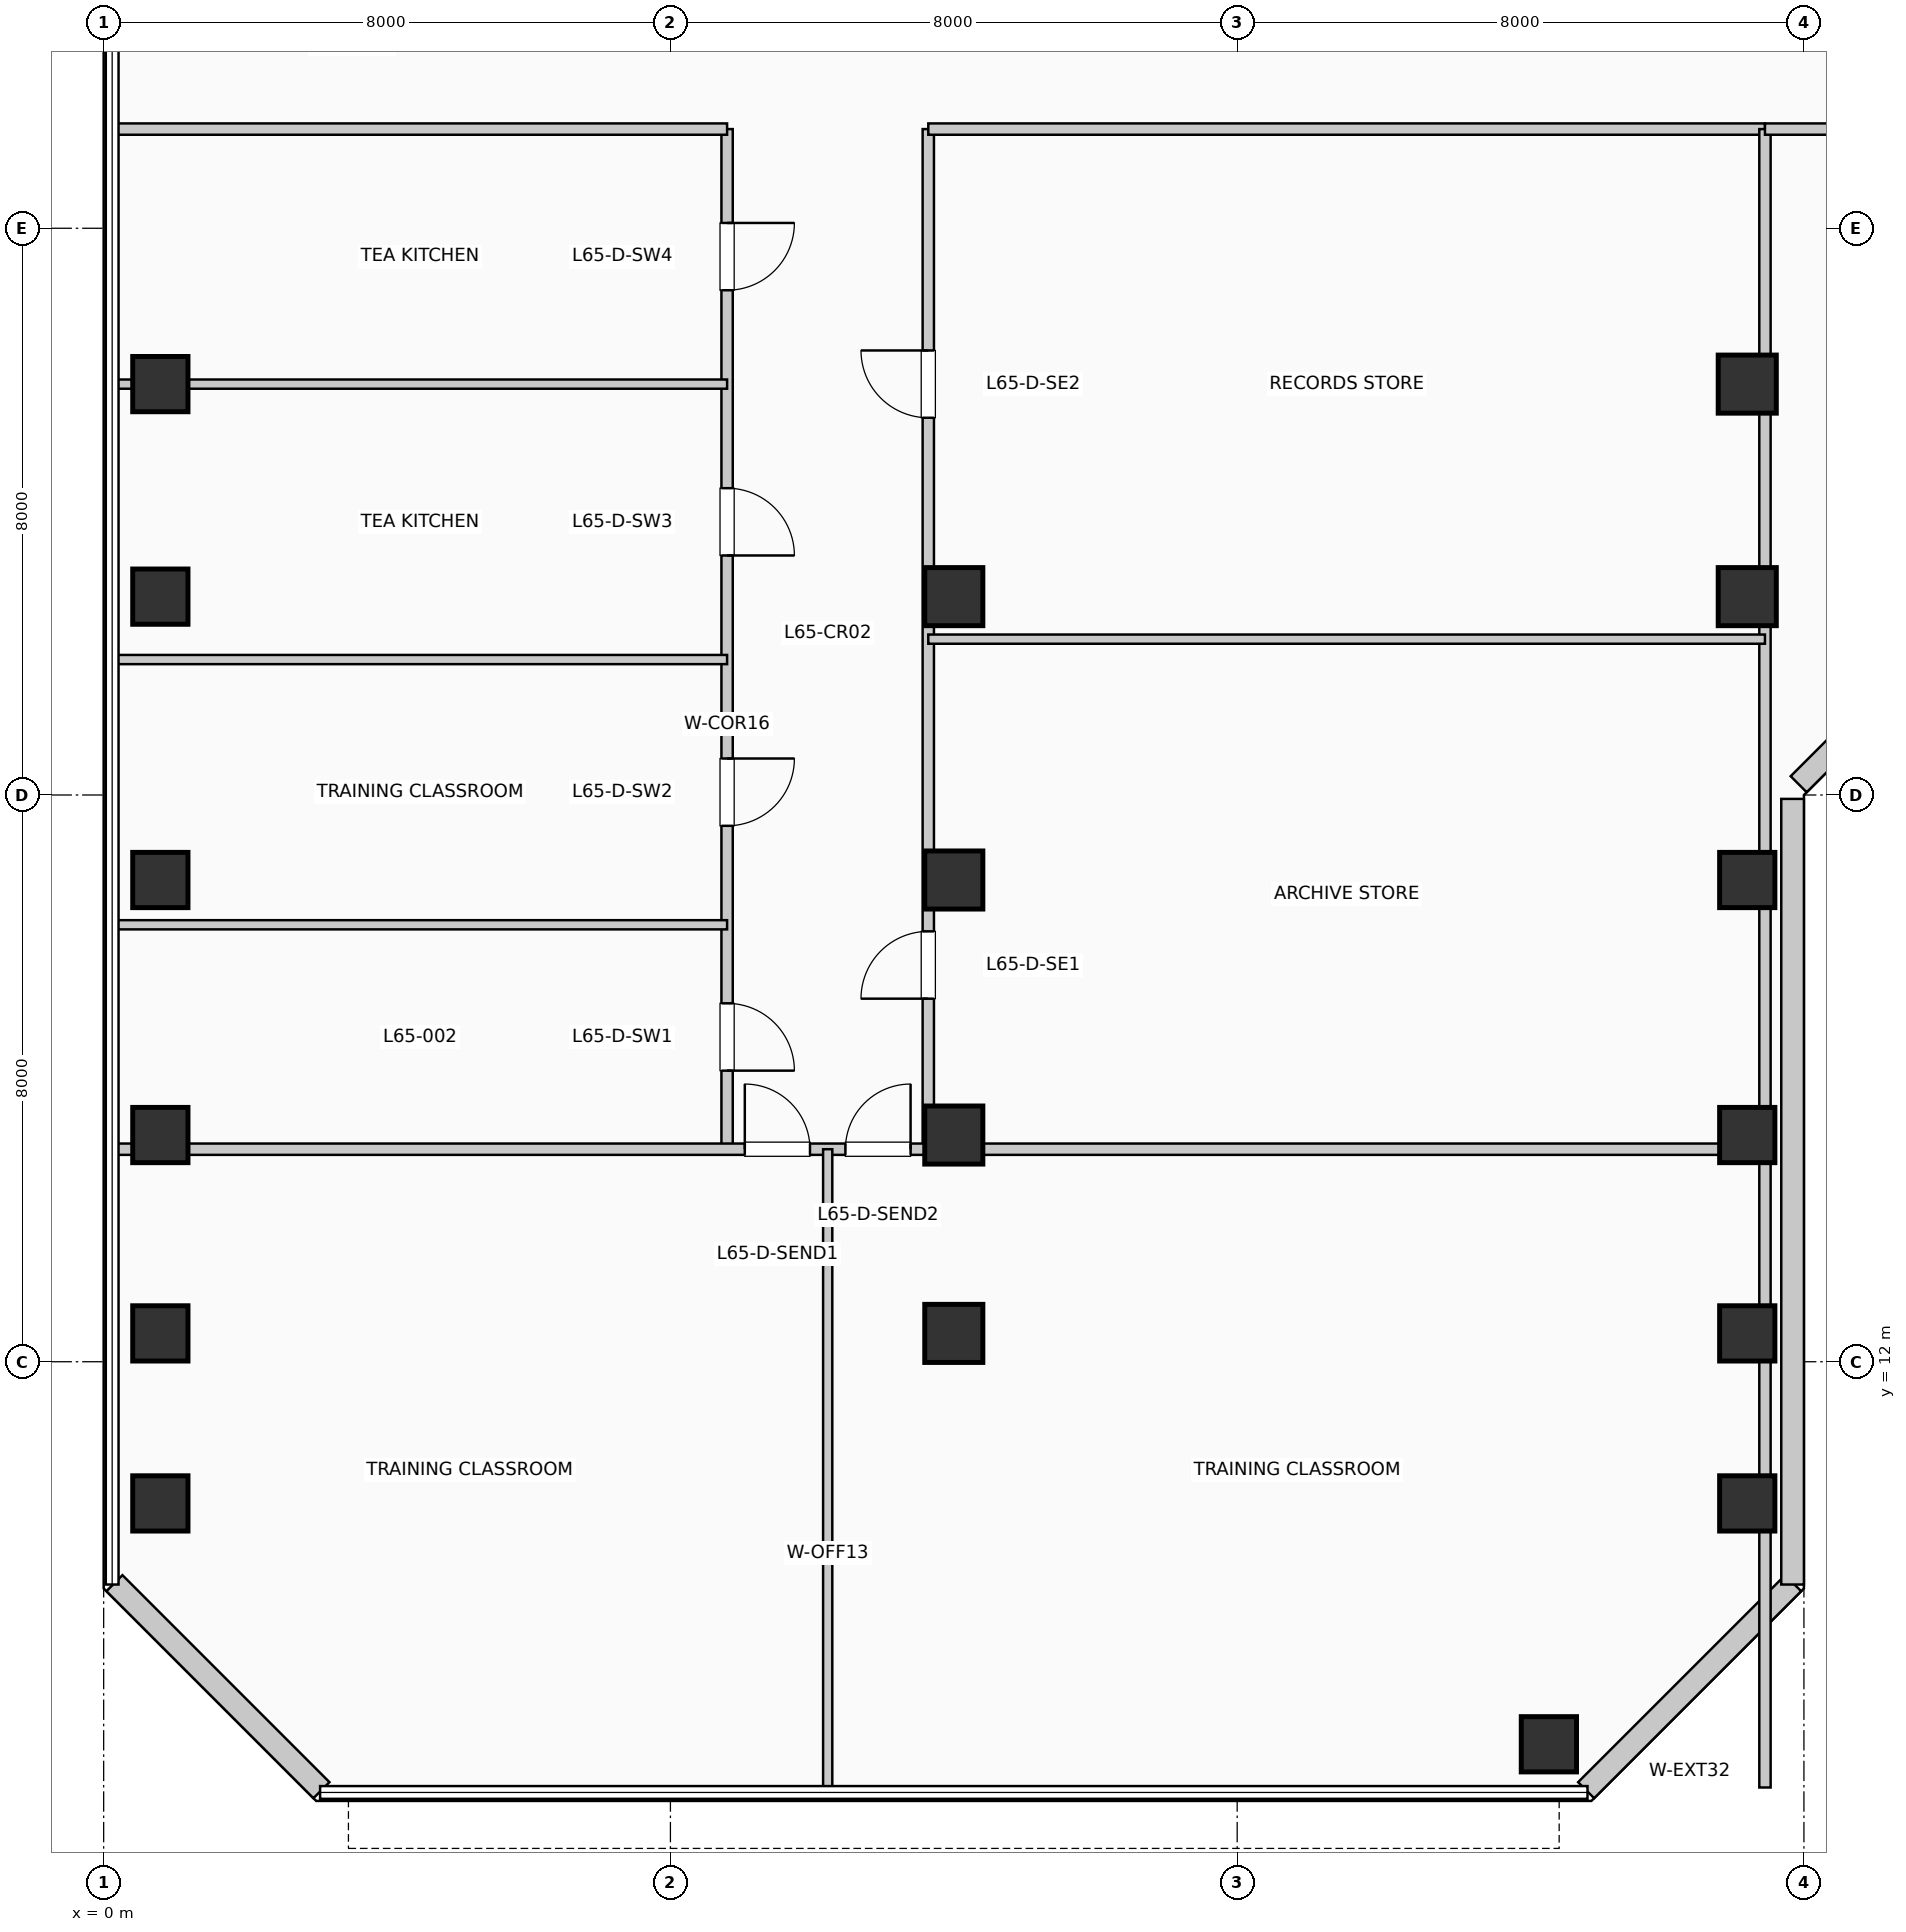
"""IFC4 building model, lengths in metres.
Left out: names, types, materials, properties, quantities, classifications, styles, units other than length and angle.
Written with IfcOpenShell. Run it as: python <this file> out.ifc"""

import sys

from ifc_helpers import new_model, si_unit, direction, frame, frame_2d, origin, origin_2d, place, context, subcontext, project, spatial, rectangle, extrude, element, fill, save


model = new_model("IFC4")
c1 = context("Model", 3, precision=1e-05, world=origin(), true_north=direction((0.0, 1.0)))
c2 = subcontext(c1, "Body", "Model", "MODEL_VIEW")
j1 = project(units=[si_unit("LENGTHUNIT", "METRE"), si_unit("PLANEANGLEUNIT", "RADIAN")], contexts=[c1])
p1 = place(None, origin())
s1 = spatial("IfcSite", under=j1, at=p1, CompositionType="ELEMENT")
p2 = place(p1, origin())
s2 = spatial("IfcBuilding", under=s1, at=p2, CompositionType="ELEMENT")
p3 = place(p2, frame((0.0, 0.0, 268.29)))
s3 = spatial("IfcBuildingStorey", under=s2, at=p3, CompositionType="ELEMENT", Elevation=268.29)
for number, where, z_axis, x_axis in (
    (1, (0.8, 10.0, 0.0), (0.0, 0.0, 1.0), (1.0, 0.0, 0.0)),
    (2, (0.8, 12.4, 0.0), (0.0, 0.0, 1.0), (1.0, 0.0, 0.0)),
    (3, (0.8, 15.2, 0.0), (0.0, 0.0, 1.0), (1.0, 0.0, 0.0)),
    (4, (0.8, 18.8, 0.0), (0.0, 0.0, 1.0), (1.0, 0.0, 0.0)),
    (5, (0.8, 22.8, 0.0), (0.0, 0.0, 1.0), (1.0, 0.0, 0.0)),
    (6, (0.8, 25.8, 0.0), (0.0, 0.0, 1.0), (1.0, 0.0, 0.0)),
):
    element("IfcColumn", number, at=place(p3, frame(where, z_axis=z_axis, x_axis=x_axis)), inside=s3, PredefinedType="COLUMN", context=c2, shape_type="SweptSolid", body=[
        extrude(rectangle(XDim=0.78, YDim=0.78, at=origin_2d()), origin(), (0.0, 0.0, 1.0), 3.96),
    ])
for number, where, z_axis, x_axis in (
    (7, (12.0, 12.4, 0.0), (0.0, 0.0, 1.0), (1.0, 0.0, 0.0)),
    (8, (12.0, 15.2, 0.0), (0.0, 0.0, 1.0), (1.0, 0.0, 0.0)),
    (9, (12.0, 18.8, 0.0), (0.0, 0.0, 1.0), (1.0, 0.0, 0.0)),
    (10, (12.0, 22.8, 0.0), (0.0, 0.0, 1.0), (1.0, 0.0, 0.0)),
):
    element("IfcColumn", number, at=place(p3, frame(where, z_axis=z_axis, x_axis=x_axis)), inside=s3, PredefinedType="COLUMN", context=c2, shape_type="SweptSolid", body=[
        extrude(rectangle(XDim=0.82, YDim=0.82, at=origin_2d()), origin(), (0.0, 0.0, 1.0), 3.96),
    ])
for number, where, z_axis, x_axis in (
    (11, (20.4, 6.6, 0.0), (0.0, 0.0, 1.0), (1.0, 0.0, 0.0)),
    (12, (23.2, 10.0, 0.0), (0.0, 0.0, 1.0), (1.0, 0.0, 0.0)),
    (13, (23.2, 12.4, 0.0), (0.0, 0.0, 1.0), (1.0, 0.0, 0.0)),
    (14, (23.2, 15.2, 0.0), (0.0, 0.0, 1.0), (1.0, 0.0, 0.0)),
    (15, (23.2, 18.8, 0.0), (0.0, 0.0, 1.0), (1.0, 0.0, 0.0)),
):
    element("IfcColumn", number, at=place(p3, frame(where, z_axis=z_axis, x_axis=x_axis)), inside=s3, PredefinedType="COLUMN", context=c2, shape_type="SweptSolid", body=[
        extrude(rectangle(XDim=0.78, YDim=0.78, at=origin_2d()), origin(), (0.0, 0.0, 1.0), 3.96),
    ])
for number, where, z_axis, x_axis in (
    (16, (23.2, 22.8, 0.0), (0.0, 0.0, 1.0), (1.0, 0.0, 0.0)),
    (17, (23.2, 25.8, 0.0), (0.0, 0.0, 1.0), (1.0, 0.0, 0.0)),
):
    element("IfcColumn", number, at=place(p3, frame(where, z_axis=z_axis, x_axis=x_axis)), inside=s3, PredefinedType="COLUMN", context=c2, shape_type="SweptSolid", body=[
        extrude(rectangle(XDim=0.82, YDim=0.82, at=origin_2d()), origin(), (0.0, 0.0, 1.0), 3.96),
    ])
p4 = place(p3, frame((20.926, 5.952, 0.0), z_axis=(0.0, 0.0, 1.0), x_axis=(0.707077242712, 0.707136318428, 0.0)))
e18 = element("IfcWall", 18, at=p4, inside=s3, PredefinedType="SOLIDWALL", context=c2, shape_type="SweptSolid", body=[
    extrude(rectangle(XDim=4.133, YDim=0.32, at=frame_2d((2.066, 0.0))), origin(), (0.0, 0.0, 1.0), 3.74),
])
p5 = place(p3, frame((23.84, 8.855, 0.0), z_axis=(0.0, 0.0, 1.0), x_axis=(0.0, 1.0, 0.0)))
e19 = element("IfcWall", 19, at=p5, inside=s3, PredefinedType="SOLIDWALL", context=c2, shape_type="SweptSolid", body=[
    extrude(rectangle(XDim=11.09, YDim=0.32, at=frame_2d((5.545, 0.0))), origin(), (0.0, 0.0, 1.0), 3.74),
])
p6 = place(p3, frame((23.926, 20.152, 0.0), z_axis=(0.0, 0.0, 1.0), x_axis=(0.707106781187, 0.707106781187, 0.0)))
e20 = element("IfcWall", 20, at=p6, inside=s3, PredefinedType="SOLIDWALL", context=c2, shape_type="SweptSolid", body=[
    extrude(rectangle(XDim=2.718, YDim=0.32, at=frame_2d((1.359, 0.0))), origin(), (0.0, 0.0, 1.0), 3.74),
])
p7 = place(p3, frame((0.152, 8.874, 0.0), z_axis=(0.0, 0.0, 1.0), x_axis=(0.707077242712, -0.707136318428, 0.0)))
e21 = element("IfcWall", 21, at=p7, inside=s3, PredefinedType="SOLIDWALL", context=c2, shape_type="SweptSolid", body=[
    extrude(rectangle(XDim=4.133, YDim=0.32, at=frame_2d((2.066, 0.0))), origin(), (0.0, 0.0, 1.0), 3.74),
])
p8 = place(p3, frame((8.8, 15.0, 0.0), z_axis=(0.0, 0.0, 1.0), x_axis=(0.0, 1.0, 0.0)))
e22 = element("IfcWall", 22, at=p8, inside=s3, PredefinedType="PARTITIONING", context=c2, shape_type="SweptSolid", body=[
    extrude(rectangle(XDim=14.4, YDim=0.16, at=frame_2d((7.2, 0.0))), origin(), (0.0, 0.0, 1.0), 3.74),
])
p9 = place(p8, frame((2.059, 0.0, 0.0), z_axis=(0.0, 0.0, 1.0), x_axis=(-1.0, 0.0, 0.0)))
e23 = element("IfcOpeningElement", 23, at=p9, cuts=e22, PredefinedType="OPENING", context=c2, shape_type="SweptSolid", body=[
    extrude(rectangle(XDim=0.95, YDim=2.15, at=frame_2d((0.475, 1.075))), frame((0.0, 0.09, 0.0), z_axis=(0.0, -1.0, 0.0), x_axis=(1.0, 0.0, 0.0)), (0.0, 0.0, 1.0), 0.18),
])
p10 = place(p8, frame((5.515, 0.0, 0.0), z_axis=(0.0, 0.0, 1.0), x_axis=(-1.0, 0.0, 0.0)))
e24 = element("IfcOpeningElement", 24, at=p10, cuts=e22, PredefinedType="OPENING", context=c2, shape_type="SweptSolid", body=[
    extrude(rectangle(XDim=0.95, YDim=2.15, at=frame_2d((0.475, 1.075))), frame((0.0, 0.09, 0.0), z_axis=(0.0, -1.0, 0.0), x_axis=(1.0, 0.0, 0.0)), (0.0, 0.0, 1.0), 0.18),
])
p11 = place(p8, frame((9.331, 0.0, 0.0), z_axis=(0.0, 0.0, 1.0), x_axis=(-1.0, 0.0, 0.0)))
e25 = element("IfcOpeningElement", 25, at=p11, cuts=e22, PredefinedType="OPENING", context=c2, shape_type="SweptSolid", body=[
    extrude(rectangle(XDim=0.95, YDim=2.15, at=frame_2d((0.475, 1.075))), frame((0.0, 0.09, 0.0), z_axis=(0.0, -1.0, 0.0), x_axis=(1.0, 0.0, 0.0)), (0.0, 0.0, 1.0), 0.18),
])
p12 = place(p8, frame((13.075, 0.0, 0.0), z_axis=(0.0, 0.0, 1.0), x_axis=(-1.0, 0.0, 0.0)))
e26 = element("IfcOpeningElement", 26, at=p12, cuts=e22, PredefinedType="OPENING", context=c2, shape_type="SweptSolid", body=[
    extrude(rectangle(XDim=0.95, YDim=2.15, at=frame_2d((0.475, 1.075))), frame((0.0, 0.09, 0.0), z_axis=(0.0, -1.0, 0.0), x_axis=(1.0, 0.0, 0.0)), (0.0, 0.0, 1.0), 0.18),
])
p13 = place(p3, frame((11.64, 15.0, 0.0), z_axis=(0.0, 0.0, 1.0), x_axis=(0.0, 1.0, 0.0)))
e27 = element("IfcWall", 27, at=p13, inside=s3, PredefinedType="PARTITIONING", context=c2, shape_type="SweptSolid", body=[
    extrude(rectangle(XDim=14.4, YDim=0.16, at=frame_2d((7.2, 0.0))), origin(), (0.0, 0.0, 1.0), 3.125),
])
p14 = place(p13, frame((2.125, 0.0, 0.0)))
e28 = element("IfcOpeningElement", 28, at=p14, cuts=e27, PredefinedType="OPENING", context=c2, shape_type="SweptSolid", body=[
    extrude(rectangle(XDim=0.95, YDim=2.15, at=frame_2d((0.475, 1.075))), frame((0.0, 0.09, 0.0), z_axis=(0.0, -1.0, 0.0), x_axis=(1.0, 0.0, 0.0)), (0.0, 0.0, 1.0), 0.18),
])
p15 = place(p13, frame((10.325, 0.0, 0.0)))
e29 = element("IfcOpeningElement", 29, at=p15, cuts=e27, PredefinedType="OPENING", context=c2, shape_type="SweptSolid", body=[
    extrude(rectangle(XDim=0.95, YDim=2.15, at=frame_2d((0.475, 1.075))), frame((0.0, 0.09, 0.0), z_axis=(0.0, -1.0, 0.0), x_axis=(1.0, 0.0, 0.0)), (0.0, 0.0, 1.0), 0.18),
])
p16 = place(p3, frame((0.19, 15.0, 0.0), z_axis=(0.0, 0.0, 1.0), x_axis=(1.0, 0.0, 0.0)))
e30 = element("IfcWall", 30, at=p16, inside=s3, PredefinedType="PARTITIONING", context=c2, shape_type="SweptSolid", body=[
    extrude(rectangle(XDim=23.26, YDim=0.16, at=frame_2d((11.63, 0.0))), origin(), (0.0, 0.0, 1.0), 3.125),
])
p17 = place(p16, frame((8.86, 0.0, 0.0)))
e31 = element("IfcOpeningElement", 31, at=p17, cuts=e30, PredefinedType="OPENING", context=c2, shape_type="SweptSolid", body=[
    extrude(rectangle(XDim=0.92, YDim=2.1, at=frame_2d((0.46, 1.05))), frame((0.0, 0.09, 0.0), z_axis=(0.0, -1.0, 0.0), x_axis=(1.0, 0.0, 0.0)), (0.0, 0.0, 1.0), 0.18),
])
p18 = place(p16, frame((10.28, 0.0, 0.0)))
e32 = element("IfcOpeningElement", 32, at=p18, cuts=e30, PredefinedType="OPENING", context=c2, shape_type="SweptSolid", body=[
    extrude(rectangle(XDim=0.92, YDim=2.1, at=frame_2d((0.46, 1.05))), frame((0.0, 0.09, 0.0), z_axis=(0.0, -1.0, 0.0), x_axis=(1.0, 0.0, 0.0)), (0.0, 0.0, 1.0), 0.18),
])
p19 = place(p3, frame((0.19, 29.4, 0.0), z_axis=(0.0, 0.0, 1.0), x_axis=(1.0, 0.0, 0.0)))
e33 = element("IfcWall", 33, at=p19, inside=s3, PredefinedType="PARTITIONING", context=c2, shape_type="SweptSolid", body=[
    extrude(rectangle(XDim=8.61, YDim=0.16, at=frame_2d((4.305, 0.0))), origin(), (0.0, 0.0, 1.0), 3.395),
])
p20 = place(p3, frame((11.64, 29.4, 0.0), z_axis=(0.0, 0.0, 1.0), x_axis=(1.0, 0.0, 0.0)))
e34 = element("IfcWall", 34, at=p20, inside=s3, PredefinedType="PARTITIONING", context=c2, shape_type="SweptSolid", body=[
    extrude(rectangle(XDim=11.81, YDim=0.16, at=frame_2d((5.905, 0.0))), origin(), (0.0, 0.0, 1.0), 3.395),
])
p21 = place(p3, frame((23.45, 5.99, 0.0), z_axis=(0.0, 0.0, 1.0), x_axis=(0.0, 1.0, 0.0)))
e35 = element("IfcWall", 35, at=p21, inside=s3, PredefinedType="PARTITIONING", context=c2, shape_type="SweptSolid", body=[
    extrude(rectangle(XDim=23.41, YDim=0.16, at=frame_2d((11.705, 0.0))), origin(), (0.0, 0.0, 1.0), 3.125),
])
p22 = place(p3, frame((10.22, 5.99, 0.0), z_axis=(0.0, 0.0, 1.0), x_axis=(0.0, 1.0, 0.0)))
e36 = element("IfcWall", 36, at=p22, inside=s3, PredefinedType="PARTITIONING", context=c2, shape_type="SweptSolid", body=[
    extrude(rectangle(XDim=9.01, YDim=0.13, at=frame_2d((4.505, 0.0))), origin(), (0.0, 0.0, 1.0), 3.74),
])
for number, where, z_axis, x_axis in (
    (37, (0.19, 18.168, 0.0), (0.0, 0.0, 1.0), (1.0, 0.0, 0.0)),
    (38, (0.19, 21.912, 0.0), (0.0, 0.0, 1.0), (1.0, 0.0, 0.0)),
):
    element("IfcWall", number, at=place(p3, frame(where, z_axis=z_axis, x_axis=x_axis)), inside=s3, PredefinedType="PARTITIONING", context=c2, shape_type="SweptSolid", body=[
        extrude(rectangle(XDim=8.61, YDim=0.13, at=frame_2d((4.305, 0.0))), origin(), (0.0, 0.0, 1.0), 3.74),
    ])
p23 = place(p3, frame((0.19, 25.8, 0.0), z_axis=(0.0, 0.0, 1.0), x_axis=(1.0, 0.0, 0.0)))
e39 = element("IfcWall", 39, at=p23, inside=s3, PredefinedType="PARTITIONING", context=c2, shape_type="SweptSolid", body=[
    extrude(rectangle(XDim=8.61, YDim=0.13, at=frame_2d((4.305, 0.0))), origin(), (0.0, 0.0, 1.0), 3.125),
])
p24 = place(p3, frame((11.64, 22.2, 0.0), z_axis=(0.0, 0.0, 1.0), x_axis=(1.0, 0.0, 0.0)))
e40 = element("IfcWall", 40, at=p24, inside=s3, PredefinedType="PARTITIONING", context=c2, shape_type="SweptSolid", body=[
    extrude(rectangle(XDim=11.81, YDim=0.13, at=frame_2d((5.905, 0.0))), origin(), (0.0, 0.0, 1.0), 3.74),
])
p25 = place(p3, frame((23.45, 29.4, 0.0), z_axis=(0.0, 0.0, 1.0), x_axis=(1.0, 0.0, 0.0)))
e41 = element("IfcWall", 41, at=p25, inside=s3, PredefinedType="PARTITIONING", context=c2, shape_type="SweptSolid", body=[
    extrude(rectangle(XDim=26.56, YDim=0.16, at=frame_2d((13.28, 0.0))), origin(), (0.0, 0.0, 1.0), 3.335),
])
p26 = place(p25, frame((7.115, 0.0, 0.0), z_axis=(0.0, 0.0, 1.0), x_axis=(-1.0, 0.0, 0.0)))
e42 = element("IfcOpeningElement", 42, at=p26, cuts=e41, PredefinedType="OPENING", context=c2, shape_type="SweptSolid", body=[
    extrude(rectangle(XDim=0.95, YDim=2.15, at=frame_2d((0.475, 1.075))), frame((0.0, 0.09, 0.0), z_axis=(0.0, -1.0, 0.0), x_axis=(1.0, 0.0, 0.0)), (0.0, 0.0, 1.0), 0.18),
])
p27 = place(p25, frame((20.395, 0.0, 0.0), z_axis=(0.0, 0.0, 1.0), x_axis=(-1.0, 0.0, 0.0)))
e43 = element("IfcOpeningElement", 43, at=p27, cuts=e41, PredefinedType="OPENING", context=c2, shape_type="SweptSolid", body=[
    extrude(rectangle(XDim=0.95, YDim=2.15, at=frame_2d((0.475, 1.075))), frame((0.0, 0.09, 0.0), z_axis=(0.0, -1.0, 0.0), x_axis=(1.0, 0.0, 0.0)), (0.0, 0.0, 1.0), 0.18),
])
p28 = place(p17, origin())
e44 = element("IfcDoor", 44, at=p28, inside=s3, OperationType="SINGLE_SWING_LEFT", PredefinedType="DOOR", context=c2, shape_type="SweptSolid", body=[
    extrude(rectangle(XDim=0.92, YDim=2.1, at=frame_2d((0.46, 1.05))), frame((0.0, 0.025, 0.0), z_axis=(0.0, -1.0, 0.0), x_axis=(1.0, 0.0, 0.0)), (0.0, 0.0, 1.0), 0.05),
])
fill(e31, e44)
p29 = place(p18, origin())
e45 = element("IfcDoor", 45, at=p29, inside=s3, OperationType="SINGLE_SWING_RIGHT", PredefinedType="DOOR", context=c2, shape_type="SweptSolid", body=[
    extrude(rectangle(XDim=0.92, YDim=2.1, at=frame_2d((0.46, 1.05))), frame((0.0, 0.025, 0.0), z_axis=(0.0, -1.0, 0.0), x_axis=(1.0, 0.0, 0.0)), (0.0, 0.0, 1.0), 0.05),
])
fill(e32, e45)
p30 = place(p9, origin())
e46 = element("IfcDoor", 46, at=p30, inside=s3, OperationType="SINGLE_SWING_LEFT", PredefinedType="DOOR", context=c2, shape_type="SweptSolid", body=[
    extrude(rectangle(XDim=0.95, YDim=2.15, at=frame_2d((0.475, 1.075))), frame((0.0, 0.025, 0.0), z_axis=(0.0, -1.0, 0.0), x_axis=(1.0, 0.0, 0.0)), (0.0, 0.0, 1.0), 0.05),
])
fill(e23, e46)
p31 = place(p10, origin())
e47 = element("IfcDoor", 47, at=p31, inside=s3, OperationType="SINGLE_SWING_RIGHT", PredefinedType="DOOR", context=c2, shape_type="SweptSolid", body=[
    extrude(rectangle(XDim=0.95, YDim=2.15, at=frame_2d((0.475, 1.075))), frame((0.0, 0.025, 0.0), z_axis=(0.0, -1.0, 0.0), x_axis=(1.0, 0.0, 0.0)), (0.0, 0.0, 1.0), 0.05),
])
fill(e24, e47)
p32 = place(p11, origin())
e48 = element("IfcDoor", 48, at=p32, inside=s3, OperationType="SINGLE_SWING_LEFT", PredefinedType="DOOR", context=c2, shape_type="SweptSolid", body=[
    extrude(rectangle(XDim=0.95, YDim=2.15, at=frame_2d((0.475, 1.075))), frame((0.0, 0.025, 0.0), z_axis=(0.0, -1.0, 0.0), x_axis=(1.0, 0.0, 0.0)), (0.0, 0.0, 1.0), 0.05),
])
fill(e25, e48)
p33 = place(p12, origin())
e49 = element("IfcDoor", 49, at=p33, inside=s3, OperationType="SINGLE_SWING_RIGHT", PredefinedType="DOOR", context=c2, shape_type="SweptSolid", body=[
    extrude(rectangle(XDim=0.95, YDim=2.15, at=frame_2d((0.475, 1.075))), frame((0.0, 0.025, 0.0), z_axis=(0.0, -1.0, 0.0), x_axis=(1.0, 0.0, 0.0)), (0.0, 0.0, 1.0), 0.05),
])
fill(e26, e49)
p34 = place(p14, origin())
e50 = element("IfcDoor", 50, at=p34, inside=s3, OperationType="SINGLE_SWING_LEFT", PredefinedType="DOOR", context=c2, shape_type="SweptSolid", body=[
    extrude(rectangle(XDim=0.95, YDim=2.15, at=frame_2d((0.475, 1.075))), frame((0.0, 0.025, 0.0), z_axis=(0.0, -1.0, 0.0), x_axis=(1.0, 0.0, 0.0)), (0.0, 0.0, 1.0), 0.05),
])
fill(e28, e50)
p35 = place(p15, origin())
e51 = element("IfcDoor", 51, at=p35, inside=s3, OperationType="SINGLE_SWING_RIGHT", PredefinedType="DOOR", context=c2, shape_type="SweptSolid", body=[
    extrude(rectangle(XDim=0.95, YDim=2.15, at=frame_2d((0.475, 1.075))), frame((0.0, 0.025, 0.0), z_axis=(0.0, -1.0, 0.0), x_axis=(1.0, 0.0, 0.0)), (0.0, 0.0, 1.0), 0.05),
])
fill(e29, e51)
save(model, sys.argv[1])
